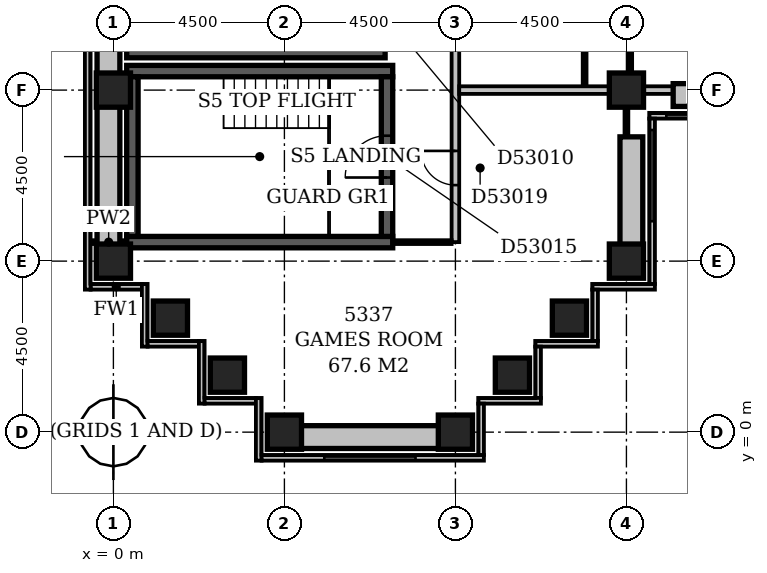
"""IFC4 building model, lengths in metres.
Left out: names, types, materials, properties, quantities, classifications, styles, units other than length and angle.
Written with IfcOpenShell. Run it as: python <this file> out.ifc"""

import sys

from ifc_helpers import new_model, si_unit, direction, frame, frame_2d, origin, origin_2d, place, context, subcontext, project, spatial, rectangle, extrude, element, fill, save


model = new_model("IFC4")
c1 = context("Model", 3, precision=1e-05, world=origin(), true_north=direction((0.0, 1.0)))
c2 = subcontext(c1, "Body", "Model", "MODEL_VIEW")
j1 = project(units=[si_unit("LENGTHUNIT", "METRE"), si_unit("PLANEANGLEUNIT", "RADIAN")], contexts=[c1])
p1 = place(None, origin())
s1 = spatial("IfcSite", under=j1, at=p1, CompositionType="ELEMENT")
p2 = place(p1, origin())
s2 = spatial("IfcBuilding", under=s1, at=p2, CompositionType="ELEMENT")
p3 = place(p2, frame((0.0, 0.0, 207.8)))
s3 = spatial("IfcBuildingStorey", under=s2, at=p3, CompositionType="ELEMENT", Elevation=207.8)
for number, where, z_axis, x_axis in (
    (1, (0.35, 5.0, -0.3), (0.0, 0.0, 1.0), (1.0, 0.0, 0.0)),
    (2, (0.35, 9.5, -0.3), (0.0, 0.0, 1.0), (1.0, 0.0, 0.0)),
):
    element("IfcWall", number, at=place(p3, frame(where, z_axis=z_axis, x_axis=x_axis)), inside=s3, PredefinedType="SHEAR", context=c2, shape_type="SweptSolid", body=[
        extrude(rectangle(XDim=7.0, YDim=0.3, at=frame_2d((3.5, 0.0))), origin(), (0.0, 0.0, 1.0), 3.55),
    ])
p4 = place(p3, frame((0.35, 10.0, -0.3), z_axis=(0.0, 0.0, 1.0), x_axis=(1.0, 0.0, 0.0)))
e3 = element("IfcWall", 3, at=p4, inside=s3, PredefinedType="SHEAR", context=c2, shape_type="SweptSolid", body=[
    extrude(rectangle(XDim=6.8, YDim=0.3, at=frame_2d((3.4, 0.0))), origin(), (0.0, 0.0, 1.0), 3.55),
])
p5 = place(p3, frame((0.5, 5.15, -0.3), z_axis=(0.0, 0.0, 1.0), x_axis=(0.0, 1.0, 0.0)))
e4 = element("IfcWall", 4, at=p5, inside=s3, PredefinedType="SHEAR", context=c2, shape_type="SweptSolid", body=[
    extrude(rectangle(XDim=4.2, YDim=0.3, at=frame_2d((2.1, 0.0))), origin(), (0.0, 0.0, 1.0), 3.55),
])
p6 = place(p3, frame((7.2, 5.15, -0.3), z_axis=(0.0, 0.0, 1.0), x_axis=(0.0, 1.0, 0.0)))
e5 = element("IfcWall", 5, at=p6, inside=s3, PredefinedType="SHEAR", context=c2, shape_type="SweptSolid", body=[
    extrude(rectangle(XDim=4.2, YDim=0.3, at=frame_2d((2.1, 0.0))), origin(), (0.0, 0.0, 1.0), 3.55),
])
p7 = place(p6, frame((1.55, 0.0, 0.3)))
e6 = element("IfcOpeningElement", 6, at=p7, cuts=e5, PredefinedType="OPENING", context=c2, shape_type="SweptSolid", body=[
    extrude(rectangle(XDim=1.1, YDim=2.1, at=frame_2d((0.55, 1.05))), frame((0.0, 0.162, 0.0), z_axis=(0.0, -1.0, 0.0), x_axis=(1.0, 0.0, 0.0)), (0.0, 0.0, 1.0), 0.324),
])
for number, where, z_axis, x_axis in (
    (7, (4.5, 0.0, -0.3), (0.0, 0.0, 1.0), (1.0, 0.0, 0.0)),
    (8, (9.0, 0.0, -0.3), (0.0, 0.0, 1.0), (1.0, 0.0, 0.0)),
    (9, (3.0, 1.5, -0.3), (0.0, 0.0, 1.0), (1.0, 0.0, 0.0)),
    (10, (10.5, 1.5, -0.3), (0.0, 0.0, 1.0), (1.0, 0.0, 0.0)),
    (11, (1.5, 3.0, -0.3), (0.0, 0.0, 1.0), (1.0, 0.0, 0.0)),
    (12, (12.0, 3.0, -0.3), (0.0, 0.0, 1.0), (1.0, 0.0, 0.0)),
    (13, (0.0, 4.5, -0.3), (0.0, 0.0, 1.0), (1.0, 0.0, 0.0)),
    (14, (13.5, 4.5, -0.3), (0.0, 0.0, 1.0), (1.0, 0.0, 0.0)),
    (15, (0.0, 9.0, -0.3), (0.0, 0.0, 1.0), (1.0, 0.0, 0.0)),
    (16, (13.5, 9.0, -0.3), (0.0, 0.0, 1.0), (1.0, 0.0, 0.0)),
):
    element("IfcColumn", number, at=place(p3, frame(where, z_axis=z_axis, x_axis=x_axis)), inside=s3, PredefinedType="COLUMN", context=c2, shape_type="SweptSolid", body=[
        extrude(rectangle(XDim=0.9, YDim=0.9, at=origin_2d()), origin(), (0.0, 0.0, 1.0), 3.55),
    ])
p8 = place(p3, frame((-0.6, 3.825, 0.0), z_axis=(0.0, 0.0, 1.0), x_axis=(1.0, 0.0, 0.0)))
e17 = element("IfcWall", 17, at=p8, inside=s3, PredefinedType="STANDARD", context=c2, shape_type="SweptSolid", body=[
    extrude(rectangle(XDim=1.35, YDim=0.15, at=frame_2d((0.675, 0.0))), origin(), (0.0, 0.0, 1.0), 2.7),
])
p9 = place(p3, frame((0.825, 3.9, 0.0), z_axis=(0.0, 0.0, 1.0), x_axis=(0.0, -1.0, 0.0)))
e18 = element("IfcWall", 18, at=p9, inside=s3, PredefinedType="STANDARD", context=c2, shape_type="SweptSolid", body=[
    extrude(rectangle(XDim=1.65, YDim=0.15, at=frame_2d((0.825, 0.0))), origin(), (0.0, 0.0, 1.0), 2.7),
])
p10 = place(p3, frame((0.9, 2.325, 0.0), z_axis=(0.0, 0.0, 1.0), x_axis=(1.0, 0.0, 0.0)))
e19 = element("IfcWall", 19, at=p10, inside=s3, PredefinedType="STANDARD", context=c2, shape_type="SweptSolid", body=[
    extrude(rectangle(XDim=1.35, YDim=0.15, at=frame_2d((0.675, 0.0))), origin(), (0.0, 0.0, 1.0), 2.7),
])
p11 = place(p3, frame((2.325, 2.4, 0.0), z_axis=(0.0, 0.0, 1.0), x_axis=(0.0, -1.0, 0.0)))
e20 = element("IfcWall", 20, at=p11, inside=s3, PredefinedType="STANDARD", context=c2, shape_type="SweptSolid", body=[
    extrude(rectangle(XDim=1.65, YDim=0.15, at=frame_2d((0.825, 0.0))), origin(), (0.0, 0.0, 1.0), 2.7),
])
p12 = place(p3, frame((2.4, 0.825, 0.0), z_axis=(0.0, 0.0, 1.0), x_axis=(1.0, 0.0, 0.0)))
e21 = element("IfcWall", 21, at=p12, inside=s3, PredefinedType="STANDARD", context=c2, shape_type="SweptSolid", body=[
    extrude(rectangle(XDim=1.35, YDim=0.15, at=frame_2d((0.675, 0.0))), origin(), (0.0, 0.0, 1.0), 2.7),
])
p13 = place(p3, frame((3.825, 0.9, 0.0), z_axis=(0.0, 0.0, 1.0), x_axis=(0.0, -1.0, 0.0)))
e22 = element("IfcWall", 22, at=p13, inside=s3, PredefinedType="STANDARD", context=c2, shape_type="SweptSolid", body=[
    extrude(rectangle(XDim=1.65, YDim=0.15, at=frame_2d((0.825, 0.0))), origin(), (0.0, 0.0, 1.0), 2.7),
])
p14 = place(p3, frame((3.9, -0.675, 0.0), z_axis=(0.0, 0.0, 1.0), x_axis=(1.0, 0.0, 0.0)))
e23 = element("IfcWall", 23, at=p14, inside=s3, PredefinedType="STANDARD", context=c2, shape_type="SweptSolid", body=[
    extrude(rectangle(XDim=5.85, YDim=0.15, at=frame_2d((2.925, 0.0))), origin(), (0.0, 0.0, 1.0), 2.7),
])
p15 = place(p14, frame((1.65, 0.0, 0.6)))
e24 = element("IfcOpeningElement", 24, at=p15, cuts=e23, PredefinedType="OPENING", context=c2, shape_type="SweptSolid", body=[
    extrude(rectangle(XDim=2.4, YDim=1.8, at=frame_2d((1.2, 0.9))), frame((0.0, 0.087, 0.0), z_axis=(0.0, -1.0, 0.0), x_axis=(1.0, 0.0, 0.0)), (0.0, 0.0, 1.0), 0.174),
])
p16 = place(p3, frame((9.675, -0.6, 0.0), z_axis=(0.0, 0.0, 1.0), x_axis=(0.0, 1.0, 0.0)))
e25 = element("IfcWall", 25, at=p16, inside=s3, PredefinedType="STANDARD", context=c2, shape_type="SweptSolid", body=[
    extrude(rectangle(XDim=1.35, YDim=0.15, at=frame_2d((0.675, 0.0))), origin(), (0.0, 0.0, 1.0), 2.7),
])
p17 = place(p3, frame((9.6, 0.825, 0.0), z_axis=(0.0, 0.0, 1.0), x_axis=(1.0, 0.0, 0.0)))
e26 = element("IfcWall", 26, at=p17, inside=s3, PredefinedType="STANDARD", context=c2, shape_type="SweptSolid", body=[
    extrude(rectangle(XDim=1.65, YDim=0.15, at=frame_2d((0.825, 0.0))), origin(), (0.0, 0.0, 1.0), 2.7),
])
p18 = place(p3, frame((11.175, 0.9, 0.0), z_axis=(0.0, 0.0, 1.0), x_axis=(0.0, 1.0, 0.0)))
e27 = element("IfcWall", 27, at=p18, inside=s3, PredefinedType="STANDARD", context=c2, shape_type="SweptSolid", body=[
    extrude(rectangle(XDim=1.35, YDim=0.15, at=frame_2d((0.675, 0.0))), origin(), (0.0, 0.0, 1.0), 2.7),
])
p19 = place(p3, frame((11.1, 2.325, 0.0), z_axis=(0.0, 0.0, 1.0), x_axis=(1.0, 0.0, 0.0)))
e28 = element("IfcWall", 28, at=p19, inside=s3, PredefinedType="STANDARD", context=c2, shape_type="SweptSolid", body=[
    extrude(rectangle(XDim=1.65, YDim=0.15, at=frame_2d((0.825, 0.0))), origin(), (0.0, 0.0, 1.0), 2.7),
])
p20 = place(p3, frame((12.675, 2.4, 0.0), z_axis=(0.0, 0.0, 1.0), x_axis=(0.0, 1.0, 0.0)))
e29 = element("IfcWall", 29, at=p20, inside=s3, PredefinedType="STANDARD", context=c2, shape_type="SweptSolid", body=[
    extrude(rectangle(XDim=1.35, YDim=0.15, at=frame_2d((0.675, 0.0))), origin(), (0.0, 0.0, 1.0), 2.7),
])
p21 = place(p3, frame((12.6, 3.825, 0.0), z_axis=(0.0, 0.0, 1.0), x_axis=(1.0, 0.0, 0.0)))
e30 = element("IfcWall", 30, at=p21, inside=s3, PredefinedType="STANDARD", context=c2, shape_type="SweptSolid", body=[
    extrude(rectangle(XDim=1.65, YDim=0.15, at=frame_2d((0.825, 0.0))), origin(), (0.0, 0.0, 1.0), 2.7),
])
p22 = place(p3, frame((14.175, 3.9, 0.0), z_axis=(0.0, 0.0, 1.0), x_axis=(0.0, 1.0, 0.0)))
e31 = element("IfcWall", 31, at=p22, inside=s3, PredefinedType="STANDARD", context=c2, shape_type="SweptSolid", body=[
    extrude(rectangle(XDim=4.35, YDim=0.15, at=frame_2d((2.175, 0.0))), origin(), (0.0, 0.0, 1.0), 2.7),
])
p23 = place(p22, frame((1.65, 0.0, 0.6)))
e32 = element("IfcOpeningElement", 32, at=p23, cuts=e31, PredefinedType="OPENING", context=c2, shape_type="SweptSolid", body=[
    extrude(rectangle(XDim=2.4, YDim=1.8, at=frame_2d((1.2, 0.9))), frame((0.0, 0.087, 0.0), z_axis=(0.0, -1.0, 0.0), x_axis=(1.0, 0.0, 0.0)), (0.0, 0.0, 1.0), 0.174),
])
p24 = place(p3, frame((14.1, 8.325, 0.0), z_axis=(0.0, 0.0, 1.0), x_axis=(1.0, 0.0, 0.0)))
e33 = element("IfcWall", 33, at=p24, inside=s3, PredefinedType="STANDARD", context=c2, shape_type="SweptSolid", body=[
    extrude(rectangle(XDim=4.65, YDim=0.15, at=frame_2d((2.325, 0.0))), origin(), (0.0, 0.0, 1.0), 2.7),
])
p25 = place(p24, frame((0.45, 0.0, 0.6)))
e34 = element("IfcOpeningElement", 34, at=p25, cuts=e33, PredefinedType="OPENING", context=c2, shape_type="SweptSolid", body=[
    extrude(rectangle(XDim=2.4, YDim=1.8, at=frame_2d((1.2, 0.9))), frame((0.0, 0.087, 0.0), z_axis=(0.0, -1.0, 0.0), x_axis=(1.0, 0.0, 0.0)), (0.0, 0.0, 1.0), 0.174),
])
p26 = place(p3, frame((-0.675, 59.1, 0.0), z_axis=(0.0, 0.0, 1.0), x_axis=(0.0, -1.0, 0.0)))
e35 = element("IfcWall", 35, at=p26, inside=s3, PredefinedType="STANDARD", context=c2, shape_type="SweptSolid", body=[
    extrude(rectangle(XDim=55.35, YDim=0.15, at=frame_2d((27.675, 0.0))), origin(), (0.0, 0.0, 1.0), 2.7),
])
p27 = place(p26, frame((42.758, 0.0, 0.6)))
e36 = element("IfcOpeningElement", 36, at=p27, cuts=e35, PredefinedType="OPENING", context=c2, shape_type="SweptSolid", body=[
    extrude(rectangle(XDim=2.1, YDim=1.8, at=frame_2d((1.05, 0.9))), frame((0.0, 0.087, 0.0), z_axis=(0.0, -1.0, 0.0), x_axis=(1.0, 0.0, 0.0)), (0.0, 0.0, 1.0), 0.174),
])
for number, where, z_axis, x_axis in (
    (37, (18.03, 8.87, 3.6), (0.0, 0.0, 1.0), (-1.0, 0.0, 0.0)),
    (38, (13.63, 7.77, 3.6), (0.0, 0.0, 1.0), (0.0, -1.0, 0.0)),
):
    element("IfcWall", number, at=place(p3, frame(where, z_axis=z_axis, x_axis=x_axis)), inside=s3, PredefinedType="STANDARD", context=c2, shape_type="SweptSolid", body=[
        extrude(rectangle(XDim=3.3, YDim=0.6, at=frame_2d((1.65, 0.0))), origin(), (0.0, 0.0, 1.0), 0.6),
    ])
p28 = place(p3, frame((9.03, -0.13, 3.6), z_axis=(0.0, 0.0, 1.0), x_axis=(-1.0, 0.0, 0.0)))
e39 = element("IfcWall", 39, at=p28, inside=s3, PredefinedType="STANDARD", context=c2, shape_type="SweptSolid", body=[
    extrude(rectangle(XDim=4.56, YDim=0.6, at=frame_2d((2.28, 0.0))), origin(), (0.0, 0.0, 1.0), 0.6),
])
p29 = place(p3, frame((-0.13, 4.47, 3.6), z_axis=(0.0, 0.0, 1.0), x_axis=(0.0, 1.0, 0.0)))
e40 = element("IfcWall", 40, at=p29, inside=s3, PredefinedType="STANDARD", context=c2, shape_type="SweptSolid", body=[
    extrude(rectangle(XDim=16.38, YDim=0.6, at=frame_2d((8.19, 0.0))), origin(), (0.0, 0.0, 1.0), 0.6),
])
p30 = place(p3, frame((4.95, 0.0, 0.0), z_axis=(0.0, 0.0, 1.0), x_axis=(1.0, 0.0, 0.0)))
e41 = element("IfcWall", 41, at=p30, inside=s3, PredefinedType="PARTITIONING", context=c2, shape_type="SweptSolid", body=[
    extrude(rectangle(XDim=3.6, YDim=0.1, at=frame_2d((1.8, 0.0))), origin(), (0.0, 0.0, 1.0), 2.7),
])
p31 = place(p3, frame((0.0, 4.95, 0.0), z_axis=(0.0, 0.0, 1.0), x_axis=(0.0, 1.0, 0.0)))
e42 = element("IfcWall", 42, at=p31, inside=s3, PredefinedType="PARTITIONING", context=c2, shape_type="SweptSolid", body=[
    extrude(rectangle(XDim=0.65, YDim=0.1, at=frame_2d((0.325, 0.0))), origin(), (0.0, 0.0, 1.0), 2.7),
])
p32 = place(p3, frame((13.5, 4.95, 0.0), z_axis=(0.0, 0.0, 1.0), x_axis=(0.0, 1.0, 0.0)))
e43 = element("IfcWall", 43, at=p32, inside=s3, PredefinedType="PARTITIONING", context=c2, shape_type="SweptSolid", body=[
    extrude(rectangle(XDim=3.6, YDim=0.1, at=frame_2d((1.8, 0.0))), origin(), (0.0, 0.0, 1.0), 2.7),
])
p33 = place(p3, frame((-0.6, 5.0, 0.0), z_axis=(0.0, 0.0, 1.0), x_axis=(1.0, 0.0, 0.0)))
e44 = element("IfcWall", 44, at=p33, inside=s3, PredefinedType="PARTITIONING", context=c2, shape_type="SweptSolid", body=[
    extrude(rectangle(XDim=0.951, YDim=0.1, at=frame_2d((0.476, 0.0))), origin(), (0.0, 0.0, 1.0), 3.25),
])
p34 = place(p3, frame((7.349, 5.0, 0.0), z_axis=(0.0, 0.0, 1.0), x_axis=(1.0, 0.0, 0.0)))
e45 = element("IfcWall", 45, at=p34, inside=s3, PredefinedType="PARTITIONING", context=c2, shape_type="SweptSolid", body=[
    extrude(rectangle(XDim=1.551, YDim=0.1, at=frame_2d((0.775, 0.0))), origin(), (0.0, 0.0, 1.0), 3.25),
])
p35 = place(p3, frame((9.0, 5.0, 0.0), z_axis=(0.0, 0.0, 1.0), x_axis=(0.0, 1.0, 0.0)))
e46 = element("IfcWall", 46, at=p35, inside=s3, PredefinedType="PARTITIONING", context=c2, shape_type="SweptSolid", body=[
    extrude(rectangle(XDim=31.0, YDim=0.2, at=frame_2d((15.5, 0.0))), origin(), (0.0, 0.0, 1.0), 3.25),
])
p36 = place(p35, frame((17.8, 0.0, 0.0)))
e47 = element("IfcOpeningElement", 47, at=p36, cuts=e46, PredefinedType="OPENING", context=c2, shape_type="SweptSolid", body=[
    extrude(rectangle(XDim=1.0, YDim=2.1, at=frame_2d((0.5, 1.05))), frame((0.0, 0.112, 0.0), z_axis=(0.0, -1.0, 0.0), x_axis=(1.0, 0.0, 0.0)), (0.0, 0.0, 1.0), 0.224),
])
p37 = place(p35, frame((14.95, 0.0, 0.0)))
e48 = element("IfcOpeningElement", 48, at=p37, cuts=e46, PredefinedType="OPENING", context=c2, shape_type="SweptSolid", body=[
    extrude(rectangle(XDim=1.0, YDim=2.1, at=frame_2d((0.5, 1.05))), frame((0.0, 0.112, 0.0), z_axis=(0.0, -1.0, 0.0), x_axis=(1.0, 0.0, 0.0)), (0.0, 0.0, 1.0), 0.224),
])
p38 = place(p35, frame((9.3, 0.0, 0.0)))
e49 = element("IfcOpeningElement", 49, at=p38, cuts=e46, PredefinedType="OPENING", context=c2, shape_type="SweptSolid", body=[
    extrude(rectangle(XDim=1.0, YDim=2.1, at=frame_2d((0.5, 1.05))), frame((0.0, 0.112, 0.0), z_axis=(0.0, -1.0, 0.0), x_axis=(1.0, 0.0, 0.0)), (0.0, 0.0, 1.0), 0.224),
])
p39 = place(p35, frame((1.5, 0.0, 0.0)))
e50 = element("IfcOpeningElement", 50, at=p39, cuts=e46, PredefinedType="OPENING", context=c2, shape_type="SweptSolid", body=[
    extrude(rectangle(XDim=0.9, YDim=2.1, at=frame_2d((0.45, 1.05))), frame((0.0, 0.112, 0.0), z_axis=(0.0, -1.0, 0.0), x_axis=(1.0, 0.0, 0.0)), (0.0, 0.0, 1.0), 0.224),
])
p40 = place(p3, frame((9.1, 9.0, 0.0), z_axis=(0.0, 0.0, 1.0), x_axis=(1.0, 0.0, 0.0)))
e51 = element("IfcWall", 51, at=p40, inside=s3, PredefinedType="PARTITIONING", context=c2, shape_type="SweptSolid", body=[
    extrude(rectangle(XDim=3.95, YDim=0.2, at=frame_2d((1.975, 0.0))), origin(), (0.0, 0.0, 1.0), 3.25),
])
p41 = place(p3, frame((13.95, 9.0, 0.0), z_axis=(0.0, 0.0, 1.0), x_axis=(1.0, 0.0, 0.0)))
e52 = element("IfcWall", 52, at=p41, inside=s3, PredefinedType="PARTITIONING", context=c2, shape_type="SweptSolid", body=[
    extrude(rectangle(XDim=3.6, YDim=0.2, at=frame_2d((1.8, 0.0))), origin(), (0.0, 0.0, 1.0), 2.7),
])
p42 = place(p3, frame((12.4, 9.1, 0.0), z_axis=(0.0, 0.0, 1.0), x_axis=(0.0, 1.0, 0.0)))
e53 = element("IfcWall", 53, at=p42, inside=s3, PredefinedType="PARTITIONING", context=c2, shape_type="SweptSolid", body=[
    extrude(rectangle(XDim=4.9, YDim=0.1, at=frame_2d((2.45, 0.0))), origin(), (0.0, 0.0, 1.0), 3.25),
])
p43 = place(p42, frame((1.95, 0.0, 0.0)))
e54 = element("IfcOpeningElement", 54, at=p43, cuts=e53, PredefinedType="OPENING", context=c2, shape_type="SweptSolid", body=[
    extrude(rectangle(XDim=0.9, YDim=2.1, at=frame_2d((0.45, 1.05))), frame((0.0, 0.062, 0.0), z_axis=(0.0, -1.0, 0.0), x_axis=(1.0, 0.0, 0.0)), (0.0, 0.0, 1.0), 0.124),
])
p44 = place(p3, frame((13.6, 9.45, 0.0), z_axis=(0.0, 0.0, 1.0), x_axis=(0.0, 1.0, 0.0)))
e55 = element("IfcWall", 55, at=p44, inside=s3, PredefinedType="PARTITIONING", context=c2, shape_type="SweptSolid", body=[
    extrude(rectangle(XDim=8.45, YDim=0.1, at=frame_2d((4.225, 0.0))), origin(), (0.0, 0.0, 1.0), 3.25),
])
p45 = place(p44, frame((1.35, 0.0, 0.0)))
e56 = element("IfcOpeningElement", 56, at=p45, cuts=e55, PredefinedType="OPENING", context=c2, shape_type="SweptSolid", body=[
    extrude(rectangle(XDim=0.9, YDim=2.1, at=frame_2d((0.45, 1.05))), frame((0.0, 0.062, 0.0), z_axis=(0.0, -1.0, 0.0), x_axis=(1.0, 0.0, 0.0)), (0.0, 0.0, 1.0), 0.124),
])
p46 = place(p44, frame((5.85, 0.0, 0.0)))
e57 = element("IfcOpeningElement", 57, at=p46, cuts=e55, PredefinedType="OPENING", context=c2, shape_type="SweptSolid", body=[
    extrude(rectangle(XDim=0.9, YDim=2.1, at=frame_2d((0.45, 1.05))), frame((0.0, 0.062, 0.0), z_axis=(0.0, -1.0, 0.0), x_axis=(1.0, 0.0, 0.0)), (0.0, 0.0, 1.0), 0.124),
])
p47 = place(p15, origin())
e58 = element("IfcWindow", 58, at=p47, inside=s3, PartitioningType="SINGLE_PANEL", PredefinedType="WINDOW", context=c2, shape_type="SweptSolid", body=[
    extrude(rectangle(XDim=2.4, YDim=1.8, at=frame_2d((1.2, 0.9))), frame((0.0, 0.03, 0.0), z_axis=(0.0, -1.0, 0.0), x_axis=(1.0, 0.0, 0.0)), (0.0, 0.0, 1.0), 0.06),
])
fill(e24, e58)
p48 = place(p23, origin())
e59 = element("IfcWindow", 59, at=p48, inside=s3, PartitioningType="SINGLE_PANEL", PredefinedType="WINDOW", context=c2, shape_type="SweptSolid", body=[
    extrude(rectangle(XDim=2.4, YDim=1.8, at=frame_2d((1.2, 0.9))), frame((0.0, 0.03, 0.0), z_axis=(0.0, -1.0, 0.0), x_axis=(1.0, 0.0, 0.0)), (0.0, 0.0, 1.0), 0.06),
])
fill(e32, e59)
p49 = place(p25, origin())
e60 = element("IfcWindow", 60, at=p49, inside=s3, PartitioningType="SINGLE_PANEL", PredefinedType="WINDOW", context=c2, shape_type="SweptSolid", body=[
    extrude(rectangle(XDim=2.4, YDim=1.8, at=frame_2d((1.2, 0.9))), frame((0.0, 0.03, 0.0), z_axis=(0.0, -1.0, 0.0), x_axis=(1.0, 0.0, 0.0)), (0.0, 0.0, 1.0), 0.06),
])
fill(e34, e60)
p50 = place(p7, origin())
e61 = element("IfcDoor", 61, at=p50, inside=s3, OperationType="SINGLE_SWING_LEFT", PredefinedType="DOOR", context=c2, shape_type="SweptSolid", body=[
    extrude(rectangle(XDim=1.1, YDim=2.1, at=frame_2d((0.55, 1.05))), frame((0.0, 0.025, 0.0), z_axis=(0.0, -1.0, 0.0), x_axis=(1.0, 0.0, 0.0)), (0.0, 0.0, 1.0), 0.05),
])
fill(e6, e61)
p51 = place(p39, frame((0.9, 0.0, 0.0), z_axis=(0.0, 0.0, 1.0), x_axis=(-1.0, 0.0, 0.0)))
e62 = element("IfcDoor", 62, at=p51, inside=s3, OperationType="SINGLE_SWING_LEFT", PredefinedType="DOOR", context=c2, shape_type="SweptSolid", body=[
    extrude(rectangle(XDim=0.9, YDim=2.1, at=frame_2d((0.45, 1.05))), frame((0.0, 0.025, 0.0), z_axis=(0.0, -1.0, 0.0), x_axis=(1.0, 0.0, 0.0)), (0.0, 0.0, 1.0), 0.05),
])
fill(e50, e62)
save(model, sys.argv[1])
